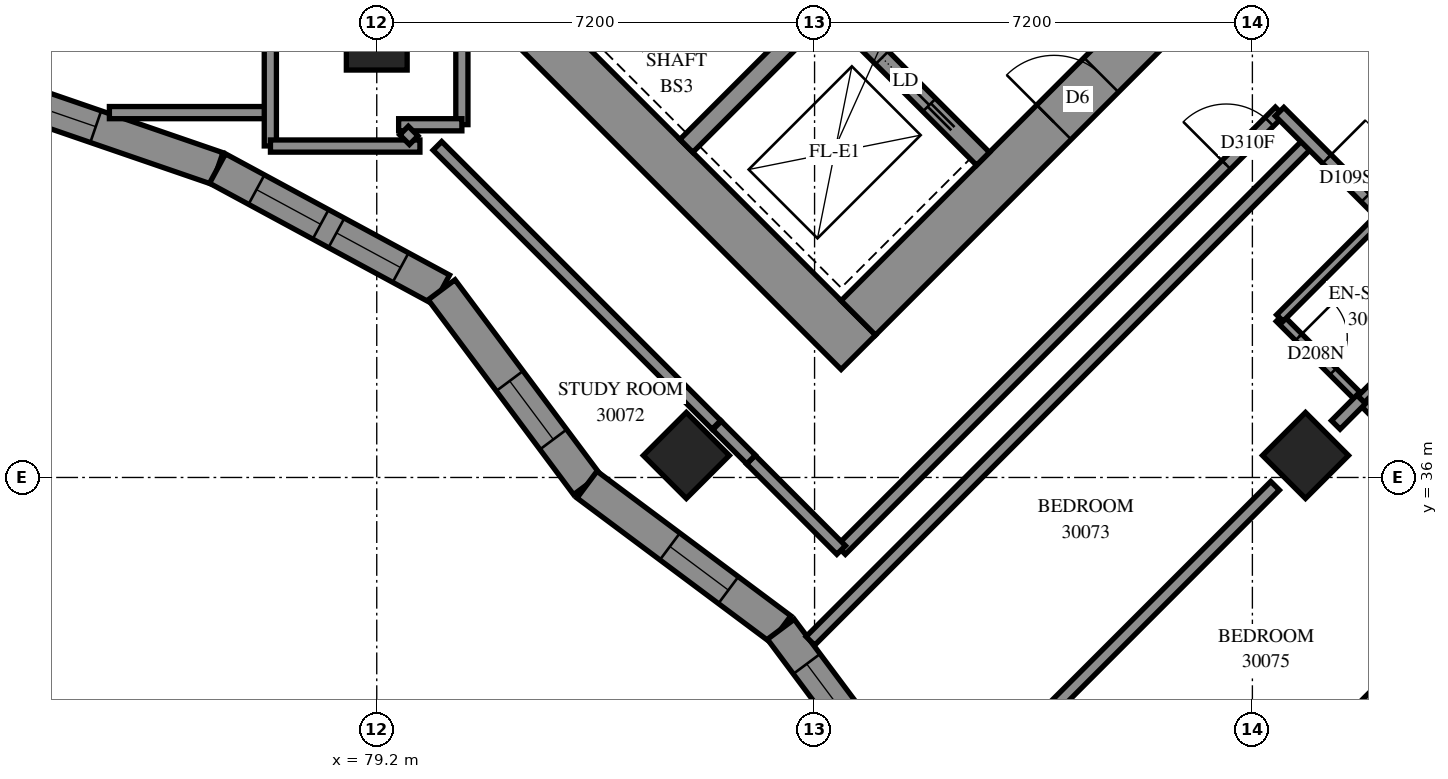
"""IFC4 building model, lengths in metres.
Left out: names, types, materials, properties, quantities, classifications, styles, units other than length and angle.
Written with IfcOpenShell. Run it as: python <this file> out.ifc"""

import sys

from ifc_helpers import new_model, si_unit, direction, frame, frame_2d, origin, origin_2d, place, context, subcontext, project, spatial, polyline, rectangle, outline, extrude, element, fill, save


model = new_model("IFC4")
c1 = context("Model", 3, precision=1e-05, world=origin(), true_north=direction((0.0, 1.0)))
c2 = subcontext(c1, "Body", "Model", "MODEL_VIEW")
j1 = project(units=[si_unit("LENGTHUNIT", "METRE"), si_unit("PLANEANGLEUNIT", "RADIAN")], contexts=[c1])
p1 = place(None, origin())
s1 = spatial("IfcSite", under=j1, at=p1, CompositionType="ELEMENT")
p2 = place(p1, origin())
s2 = spatial("IfcBuilding", under=s1, at=p2, CompositionType="ELEMENT")
p3 = place(p2, frame((0.0, 0.0, 111.8)))
s3 = spatial("IfcBuildingStorey", under=s2, at=p3, CompositionType="ELEMENT", Elevation=111.8)
for number, where, z_axis, x_axis in (
    (1, (79.2, 43.2, 0.0), (0.0, 0.0, 1.0), (1.0, 0.0, 0.0)),
    (2, (84.291, 36.362, 0.0), (0.0, 0.0, 1.0), (0.707, -0.707, 0.0)),
    (3, (94.474, 36.362, 0.0), (0.0, 0.0, 1.0), (0.707, -0.707, 0.0)),
):
    element("IfcColumn", number, at=place(p3, frame(where, z_axis=z_axis, x_axis=x_axis)), inside=s3, PredefinedType="COLUMN", context=c2, shape_type="SweptSolid", body=[
        extrude(rectangle(XDim=1.0, YDim=1.0, at=origin_2d()), origin(), (0.0, 0.0, 1.0), 3.1),
    ])
p4 = place(p3, frame((75.806, 49.373, -0.3), z_axis=(0.0, 0.0, 1.0), x_axis=(0.7071067812, -0.7071067812, 0.0)))
e4 = element("IfcWall", 4, at=p4, inside=s3, PredefinedType="SHEAR", context=c2, shape_type="SweptSolid", body=[
    extrude(rectangle(XDim=16.0, YDim=0.8, at=frame_2d((8.0, 0.0))), origin(), (0.0, 0.0, 1.0), 2.7),
])
p5 = place(p3, frame((87.12, 38.625, -0.3), z_axis=(0.0, 0.0, 1.0), x_axis=(0.7071067812, 0.7071067812, 0.0)))
e5 = element("IfcWall", 5, at=p5, inside=s3, PredefinedType="SHEAR", context=c2, shape_type="SweptSolid", body=[
    extrude(rectangle(XDim=14.4, YDim=0.8, at=frame_2d((7.2, 0.0))), origin(), (0.0, 0.0, 1.0), 2.7),
])
p6 = place(p5, frame((4.55, 0.0, 0.3)))
e6 = element("IfcOpeningElement", 6, at=p6, cuts=e5, PredefinedType="OPENING", context=c2, shape_type="SweptSolid", body=[
    extrude(rectangle(XDim=1.1, YDim=2.1, at=frame_2d((0.55, 1.05))), frame((0.0, 0.41, 0.0), z_axis=(0.0, -1.0, 0.0), x_axis=(1.0, 0.0, 0.0)), (0.0, 0.0, 1.0), 0.82),
])
p7 = place(p5, frame((11.35, 0.0, 0.3)))
e7 = element("IfcOpeningElement", 7, at=p7, cuts=e5, PredefinedType="OPENING", context=c2, shape_type="SweptSolid", body=[
    extrude(rectangle(XDim=1.1, YDim=2.1, at=frame_2d((0.55, 1.05))), frame((0.0, 0.41, 0.0), z_axis=(0.0, -1.0, 0.0), x_axis=(1.0, 0.0, 0.0)), (0.0, 0.0, 1.0), 0.82),
])
p8 = place(p3, frame((84.291, 41.453, 0.0), z_axis=(0.0, 0.0, 1.0), x_axis=(0.7071067812, 0.7071067812, 0.0)))
e8 = element("IfcWall", 8, at=p8, inside=s3, PredefinedType="SOLIDWALL", context=c2, shape_type="SweptSolid", body=[
    extrude(rectangle(XDim=3.3, YDim=0.3, at=frame_2d((1.65, 0.0))), origin(), (0.0, 0.0, 1.0), 3.1),
])
p9 = place(p3, frame((78.988, 51.423, 0.0), z_axis=(0.0, 0.0, 1.0), x_axis=(0.7071067812, -0.7071067812, 0.0)))
e9 = element("IfcWall", 9, at=p9, inside=s3, PredefinedType="SOLIDWALL", context=c2, shape_type="SweptSolid", body=[
    extrude(rectangle(XDim=14.4, YDim=0.3, at=frame_2d((7.2, 0.0))), origin(), (0.0, 0.0, 1.0), 3.1),
])
p10 = place(p9, frame((1.25, 0.0, 0.0)))
e10 = element("IfcOpeningElement", 10, at=p10, cuts=e9, PredefinedType="OPENING", context=c2, shape_type="SweptSolid", body=[
    extrude(rectangle(XDim=1.1, YDim=2.1, at=frame_2d((0.55, 1.05))), frame((0.0, 0.16, 0.0), z_axis=(0.0, -1.0, 0.0), x_axis=(1.0, 0.0, 0.0)), (0.0, 0.0, 1.0), 0.32),
])
p11 = place(p9, frame((4.85, 0.0, 0.0)))
e11 = element("IfcOpeningElement", 11, at=p11, cuts=e9, PredefinedType="OPENING", context=c2, shape_type="SweptSolid", body=[
    extrude(rectangle(XDim=1.1, YDim=2.1, at=frame_2d((0.55, 1.05))), frame((0.0, 0.16, 0.0), z_axis=(0.0, -1.0, 0.0), x_axis=(1.0, 0.0, 0.0)), (0.0, 0.0, 1.0), 0.32),
])
p12 = place(p9, frame((8.45, 0.0, 0.0)))
e12 = element("IfcOpeningElement", 12, at=p12, cuts=e9, PredefinedType="OPENING", context=c2, shape_type="SweptSolid", body=[
    extrude(rectangle(XDim=1.1, YDim=2.1, at=frame_2d((0.55, 1.05))), frame((0.0, 0.16, 0.0), z_axis=(0.0, -1.0, 0.0), x_axis=(1.0, 0.0, 0.0)), (0.0, 0.0, 1.0), 0.32),
])
p13 = place(p9, frame((12.05, 0.0, 0.0)))
e13 = element("IfcOpeningElement", 13, at=p13, cuts=e9, PredefinedType="OPENING", context=c2, shape_type="SweptSolid", body=[
    extrude(rectangle(XDim=1.1, YDim=2.1, at=frame_2d((0.55, 1.05))), frame((0.0, 0.16, 0.0), z_axis=(0.0, -1.0, 0.0), x_axis=(1.0, 0.0, 0.0)), (0.0, 0.0, 1.0), 0.32),
])
p14 = place(p3, frame((73.085, 42.283, 0.0), z_axis=(0.0, 0.0, 1.0), x_axis=(0.9456660696, -0.3251394852, 0.0)))
e14 = element("IfcWall", 14, at=p14, inside=s3, PredefinedType="SOLIDWALL", context=c2, shape_type="SweptSolid", body=[
    extrude(outline(polyline([(0.07, -0.275), (3.675, -0.275), (3.72, 0.275), (-0.07, 0.275), (0.07, -0.275)])), origin(), (0.0, 0.0, 1.0), 3.1),
])
p15 = place(p14, frame((0.38, 0.0, 0.5)))
e15 = element("IfcOpeningElement", 15, at=p15, cuts=e14, PredefinedType="OPENING", context=c2, shape_type="SweptSolid", body=[
    extrude(rectangle(XDim=1.2, YDim=2.45, at=frame_2d((0.6, 1.225))), frame((0.0, 0.285, 0.0), z_axis=(0.0, -1.0, 0.0), x_axis=(1.0, 0.0, 0.0)), (0.0, 0.0, 1.0), 0.57),
])
p16 = place(p3, frame((76.581, 41.081, 0.0), z_axis=(0.0, 0.0, 1.0), x_axis=(0.8794967773, -0.475904842, 0.0)))
e16 = element("IfcWall", 16, at=p16, inside=s3, PredefinedType="SOLIDWALL", context=c2, shape_type="SweptSolid", body=[
    extrude(outline(polyline([(0.023, -0.275), (4.13, -0.275), (4.251, 0.275), (-0.023, 0.275), (0.023, -0.275)])), origin(), (0.0, 0.0, 1.0), 3.1),
])
p17 = place(p16, frame((0.729, 0.0, 0.5)))
e17 = element("IfcOpeningElement", 17, at=p17, cuts=e16, PredefinedType="OPENING", context=c2, shape_type="SweptSolid", body=[
    extrude(rectangle(XDim=1.2, YDim=2.45, at=frame_2d((0.6, 1.225))), frame((0.0, 0.285, 0.0), z_axis=(0.0, -1.0, 0.0), x_axis=(1.0, 0.0, 0.0)), (0.0, 0.0, 1.0), 0.57),
])
p18 = place(p16, frame((2.224, 0.0, 0.5)))
e18 = element("IfcOpeningElement", 18, at=p18, cuts=e16, PredefinedType="OPENING", context=c2, shape_type="SweptSolid", body=[
    extrude(rectangle(XDim=1.2, YDim=2.45, at=frame_2d((0.6, 1.225))), frame((0.0, 0.285, 0.0), z_axis=(0.0, -1.0, 0.0), x_axis=(1.0, 0.0, 0.0)), (0.0, 0.0, 1.0), 0.57),
])
p19 = place(p3, frame((80.266, 39.087, 0.0), z_axis=(0.0, 0.0, 1.0), x_axis=(0.5980693066, -0.8014443864, 0.0)))
e19 = element("IfcWall", 19, at=p19, inside=s3, PredefinedType="SOLIDWALL", context=c2, shape_type="SweptSolid", body=[
    extrude(outline(polyline([(0.061, -0.275), (4.038, -0.275), (3.958, 0.275), (-0.061, 0.275), (0.061, -0.275)])), origin(), (0.0, 0.0, 1.0), 3.1),
])
p20 = place(p19, frame((1.871, 0.0, 0.5)))
e20 = element("IfcOpeningElement", 20, at=p20, cuts=e19, PredefinedType="OPENING", context=c2, shape_type="SweptSolid", body=[
    extrude(rectangle(XDim=1.2, YDim=2.45, at=frame_2d((0.6, 1.225))), frame((0.0, 0.285, 0.0), z_axis=(0.0, -1.0, 0.0), x_axis=(1.0, 0.0, 0.0)), (0.0, 0.0, 1.0), 0.57),
])
p21 = place(p3, frame((82.658, 35.882, 0.0), z_axis=(0.0, 0.0, 1.0), x_axis=(0.8014458841, -0.5980672997, 0.0)))
e21 = element("IfcWall", 21, at=p21, inside=s3, PredefinedType="SOLIDWALL", context=c2, shape_type="SweptSolid", body=[
    extrude(outline(polyline([(-0.04, -0.275), (3.937, -0.275), (4.017, 0.275), (0.04, 0.275), (-0.04, -0.275)])), origin(), (0.0, 0.0, 1.0), 3.1),
])
p22 = place(p21, frame((1.701, 0.0, 0.5)))
e22 = element("IfcOpeningElement", 22, at=p22, cuts=e21, PredefinedType="OPENING", context=c2, shape_type="SweptSolid", body=[
    extrude(rectangle(XDim=1.2, YDim=2.45, at=frame_2d((0.6, 1.225))), frame((0.0, 0.285, 0.0), z_axis=(0.0, -1.0, 0.0), x_axis=(1.0, 0.0, 0.0)), (0.0, 0.0, 1.0), 0.57),
])
p23 = place(p3, frame((85.845, 33.504, 0.0), z_axis=(0.0, 0.0, 1.0), x_axis=(0.5980713977, -0.801442826, 0.0)))
e23 = element("IfcWall", 23, at=p23, inside=s3, PredefinedType="SOLIDWALL", context=c2, shape_type="SweptSolid", body=[
    extrude(outline(polyline([(0.04, -0.275), (4.017, -0.275), (3.937, 0.275), (-0.04, 0.275), (0.04, -0.275)])), origin(), (0.0, 0.0, 1.0), 3.1),
])
p24 = place(p23, frame((0.711, 0.0, 0.5)))
e24 = element("IfcOpeningElement", 24, at=p24, cuts=e23, PredefinedType="OPENING", context=c2, shape_type="SweptSolid", body=[
    extrude(rectangle(XDim=1.3, YDim=2.45, at=frame_2d((0.65, 1.225))), frame((0.0, 0.285, 0.0), z_axis=(0.0, -1.0, 0.0), x_axis=(1.0, 0.0, 0.0)), (0.0, 0.0, 1.0), 0.57),
])
p25 = place(p23, frame((2.211, 0.0, 0.5)))
e25 = element("IfcOpeningElement", 25, at=p25, cuts=e23, PredefinedType="OPENING", context=c2, shape_type="SweptSolid", body=[
    extrude(rectangle(XDim=1.3, YDim=2.45, at=frame_2d((0.65, 1.225))), frame((0.0, 0.285, 0.0), z_axis=(0.0, -1.0, 0.0), x_axis=(1.0, 0.0, 0.0)), (0.0, 0.0, 1.0), 0.57),
])
p26 = place(p3, frame((86.331, 33.312, 0.0), z_axis=(0.0, 0.0, 1.0), x_axis=(0.707102476, 0.7071110864, 0.0)))
e26 = element("IfcWall", 26, at=p26, inside=s3, PredefinedType="PARTITIONING", context=c2, shape_type="SweptSolid", body=[
    extrude(rectangle(XDim=11.614, YDim=0.2, at=frame_2d((5.807, 0.0))), origin(), (0.0, 0.0, 1.0), 3.1),
])
p27 = place(p3, frame((91.452, 28.25, 0.0), z_axis=(0.0, 0.0, 1.0), x_axis=(0.7071931897, 0.7070203621, 0.0)))
e27 = element("IfcWall", 27, at=p27, inside=s3, PredefinedType="PARTITIONING", context=c2, shape_type="SweptSolid", body=[
    extrude(rectangle(XDim=11.572, YDim=0.2, at=frame_2d((5.786, 0.0))), origin(), (0.0, 0.0, 1.0), 3.1),
])
p28 = place(p3, frame((86.835, 34.806, 0.0), z_axis=(0.0, 0.0, 1.0), x_axis=(0.7071067812, 0.7071067812, 0.0)))
e28 = element("IfcWall", 28, at=p28, inside=s3, PredefinedType="PARTITIONING", context=c2, shape_type="SweptSolid", body=[
    extrude(rectangle(XDim=10.201, YDim=0.2, at=frame_2d((5.1, 0.0))), origin(), (0.0, 0.0, 1.0), 3.1),
])
p29 = place(p28, frame((8.959, 0.0, 0.0)))
e29 = element("IfcOpeningElement", 29, at=p29, cuts=e28, PredefinedType="OPENING", context=c2, shape_type="SweptSolid", body=[
    extrude(rectangle(XDim=1.0, YDim=2.1, at=frame_2d((0.5, 1.05))), frame((0.0, 0.11, 0.0), z_axis=(0.0, -1.0, 0.0), x_axis=(1.0, 0.0, 0.0)), (0.0, 0.0, 1.0), 0.22),
])
p30 = place(p3, frame((94.047, 42.015, 0.0), z_axis=(0.0, 0.0, 1.0), x_axis=(0.7071067812, -0.7071067812, 0.0)))
e30 = element("IfcWall", 30, at=p30, inside=s3, PredefinedType="PARTITIONING", context=c2, shape_type="SweptSolid", body=[
    extrude(rectangle(XDim=9.6, YDim=0.2, at=frame_2d((4.8, 0.0))), origin(), (0.0, 0.0, 1.0), 3.1),
])
p31 = place(p30, frame((1.099, 0.0, 0.0)))
e31 = element("IfcOpeningElement", 31, at=p31, cuts=e30, PredefinedType="OPENING", context=c2, shape_type="SweptSolid", body=[
    extrude(rectangle(XDim=0.9, YDim=2.1, at=frame_2d((0.45, 1.05))), frame((0.0, 0.11, 0.0), z_axis=(0.0, -1.0, 0.0), x_axis=(1.0, 0.0, 0.0)), (0.0, 0.0, 1.0), 0.22),
])
p32 = place(p30, frame((6.649, 0.0, 0.0)))
e32 = element("IfcOpeningElement", 32, at=p32, cuts=e30, PredefinedType="OPENING", context=c2, shape_type="SweptSolid", body=[
    extrude(rectangle(XDim=0.9, YDim=2.1, at=frame_2d((0.45, 1.05))), frame((0.0, 0.11, 0.0), z_axis=(0.0, -1.0, 0.0), x_axis=(1.0, 0.0, 0.0)), (0.0, 0.0, 1.0), 0.22),
])
p33 = place(p30, frame((8.3, 0.0, 0.0)))
e33 = element("IfcOpeningElement", 33, at=p33, cuts=e30, PredefinedType="OPENING", context=c2, shape_type="SweptSolid", body=[
    extrude(rectangle(XDim=0.9, YDim=2.1, at=frame_2d((0.45, 1.05))), frame((0.0, 0.11, 0.0), z_axis=(0.0, -1.0, 0.0), x_axis=(1.0, 0.0, 0.0)), (0.0, 0.0, 1.0), 0.22),
])
p34 = place(p3, frame((80.197, 41.453, 0.0), z_axis=(0.0, 0.0, 1.0), x_axis=(0.7071067812, -0.7071067812, 0.0)))
e34 = element("IfcWall", 34, at=p34, inside=s3, PredefinedType="PARTITIONING", context=c2, shape_type="SweptSolid", body=[
    extrude(rectangle(XDim=6.488, YDim=0.2, at=frame_2d((3.244, 0.0))), origin(), (0.0, 0.0, 1.0), 3.1),
])
p35 = place(p3, frame((89.881, 31.771, 0.0), z_axis=(0.0, 0.0, 1.0), x_axis=(0.7071067812, 0.7071067812, 0.0)))
e35 = element("IfcWall", 35, at=p35, inside=s3, PredefinedType="PARTITIONING", context=c2, shape_type="SweptSolid", body=[
    extrude(rectangle(XDim=5.787, YDim=0.2, at=frame_2d((2.893, 0.0))), origin(), (0.0, 0.0, 1.0), 3.1),
])
p36 = place(p3, frame((94.047, 38.621, 0.0), z_axis=(0.0, 0.0, 1.0), x_axis=(0.7071067812, -0.7071067812, 0.0)))
e36 = element("IfcWall", 36, at=p36, inside=s3, PredefinedType="PARTITIONING", context=c2, shape_type="SweptSolid", body=[
    extrude(rectangle(XDim=3.799, YDim=0.15, at=frame_2d((1.899, 0.0))), origin(), (0.0, 0.0, 1.0), 3.1),
])
p37 = place(p36, frame((0.444, 0.0, 0.0)))
e37 = element("IfcOpeningElement", 37, at=p37, cuts=e36, PredefinedType="OPENING", context=c2, shape_type="SweptSolid", body=[
    extrude(rectangle(XDim=0.8, YDim=2.1, at=frame_2d((0.4, 1.05))), frame((0.0, 0.085, 0.0), z_axis=(0.0, -1.0, 0.0), x_axis=(1.0, 0.0, 0.0)), (0.0, 0.0, 1.0), 0.17),
])
p38 = place(p36, frame((2.551, 0.0, 0.0)))
e38 = element("IfcOpeningElement", 38, at=p38, cuts=e36, PredefinedType="OPENING", context=c2, shape_type="SweptSolid", body=[
    extrude(rectangle(XDim=0.8, YDim=2.1, at=frame_2d((0.4, 1.05))), frame((0.0, 0.085, 0.0), z_axis=(0.0, -1.0, 0.0), x_axis=(1.0, 0.0, 0.0)), (0.0, 0.0, 1.0), 0.17),
])
p39 = place(p3, frame((74.803, 42.0, 0.0), z_axis=(0.0, 0.0, 1.0), x_axis=(1.0, 0.0, 0.0)))
e39 = element("IfcWall", 39, at=p39, inside=s3, PredefinedType="PARTITIONING", context=c2, shape_type="SweptSolid", body=[
    extrude(rectangle(XDim=2.647, YDim=0.2, at=frame_2d((1.323, 0.0))), origin(), (0.0, 0.0, 1.0), 3.1),
])
for number, where, z_axis, x_axis in (
    (40, (77.45, 41.452, 0.0), (0.0, 0.0, 1.0), (0.0, 1.0, 0.0)),
    (41, (77.452, 41.45, 0.0), (0.0, 0.0, 1.0), (1.0, 0.0, 0.0)),
):
    element("IfcWall", number, at=place(p3, frame(where, z_axis=z_axis, x_axis=x_axis)), inside=s3, PredefinedType="PARTITIONING", context=c2, shape_type="SweptSolid", body=[
        extrude(rectangle(XDim=2.458, YDim=0.2, at=frame_2d((1.229, 0.0))), origin(), (0.0, 0.0, 1.0), 3.1),
    ])
for number, where, z_axis, x_axis in (
    (42, (95.389, 37.285, 0.0), (0.0, 0.0, 1.0), (0.708, 0.707, 0.0)),
    (43, (94.052, 38.622, 0.0), (0.0, 0.0, 1.0), (0.707, 0.708, 0.0)),
):
    element("IfcWall", number, at=place(p3, frame(where, z_axis=z_axis, x_axis=x_axis)), inside=s3, PredefinedType="PARTITIONING", context=c2, shape_type="SweptSolid", body=[
        extrude(rectangle(XDim=2.4, YDim=0.15, at=frame_2d((1.2, 0.0))), origin(), (0.0, 0.0, 1.0), 3.1),
    ])
p40 = place(p3, frame((85.353, 36.293, 0.0), z_axis=(0.0, 0.0, 1.0), x_axis=(0.7066304548, -0.7075827869, 0.0)))
e44 = element("IfcWall", 44, at=p40, inside=s3, PredefinedType="PARTITIONING", context=c2, shape_type="SweptSolid", body=[
    extrude(rectangle(XDim=2.1, YDim=0.2, at=frame_2d((1.05, 0.0))), origin(), (0.0, 0.0, 1.0), 3.1),
])
p41 = place(p3, frame((80.6, 41.802, 0.0), z_axis=(0.0, 0.0, 1.0), x_axis=(0.0, 1.0, 0.0)))
e45 = element("IfcWall", 45, at=p41, inside=s3, PredefinedType="PARTITIONING", context=c2, shape_type="SweptSolid", body=[
    extrude(rectangle(XDim=2.098, YDim=0.2, at=frame_2d((1.049, 0.0))), origin(), (0.0, 0.0, 1.0), 3.1),
])
p42 = place(p3, frame((79.56, 41.8, 0.0), z_axis=(0.0, 0.0, 1.0), x_axis=(1.0, 0.0, 0.0)))
e46 = element("IfcWall", 46, at=p42, inside=s3, PredefinedType="PARTITIONING", context=c2, shape_type="SweptSolid", body=[
    extrude(rectangle(XDim=1.04, YDim=0.2, at=frame_2d((0.52, 0.0))), origin(), (0.0, 0.0, 1.0), 3.1),
])
p43 = place(p3, frame((84.795, 36.855, 0.0), z_axis=(0.0, 0.0, 1.0), x_axis=(0.7071067812, -0.7071067812, 0.0)))
e47 = element("IfcWall", 47, at=p43, inside=s3, PredefinedType="PARTITIONING", context=c2, shape_type="SweptSolid", body=[
    extrude(rectangle(XDim=0.792, YDim=0.2, at=frame_2d((0.396, 0.0))), origin(), (0.0, 0.0, 1.0), 3.1),
])
p44 = place(p3, frame((94.971, 36.865, 0.0), z_axis=(0.0, 0.0, 1.0), x_axis=(0.7054171665, 0.7087923682, 0.0)))
e48 = element("IfcWall", 48, at=p44, inside=s3, PredefinedType="PARTITIONING", context=c2, shape_type="SweptSolid", body=[
    extrude(rectangle(XDim=0.593, YDim=0.2, at=frame_2d((0.296, 0.0))), origin(), (0.0, 0.0, 1.0), 3.1),
])
p45 = place(p3, frame((79.649, 41.705, 0.0), z_axis=(0.0, 0.0, 1.0), x_axis=(0.7068844555, -0.707329037, 0.0)))
e49 = element("IfcWall", 49, at=p45, inside=s3, PredefinedType="PARTITIONING", context=c2, shape_type="SweptSolid", body=[
    extrude(rectangle(XDim=0.225, YDim=0.2, at=frame_2d((0.112, 0.0))), origin(), (0.0, 0.0, 1.0), 3.1),
])
p46 = place(p15, origin())
e50 = element("IfcWindow", 50, at=p46, inside=s3, PartitioningType="SINGLE_PANEL", PredefinedType="WINDOW", context=c2, shape_type="SweptSolid", body=[
    extrude(rectangle(XDim=1.2, YDim=2.45, at=frame_2d((0.6, 1.225))), frame((0.0, 0.155, 0.0), z_axis=(0.0, -1.0, 0.0), x_axis=(1.0, 0.0, 0.0)), (0.0, 0.0, 1.0), 0.06),
])
fill(e15, e50)
p47 = place(p17, origin())
e51 = element("IfcWindow", 51, at=p47, inside=s3, PartitioningType="SINGLE_PANEL", PredefinedType="WINDOW", context=c2, shape_type="SweptSolid", body=[
    extrude(rectangle(XDim=1.2, YDim=2.45, at=frame_2d((0.6, 1.225))), frame((0.0, 0.155, 0.0), z_axis=(0.0, -1.0, 0.0), x_axis=(1.0, 0.0, 0.0)), (0.0, 0.0, 1.0), 0.06),
])
fill(e17, e51)
p48 = place(p18, origin())
e52 = element("IfcWindow", 52, at=p48, inside=s3, PartitioningType="SINGLE_PANEL", PredefinedType="WINDOW", context=c2, shape_type="SweptSolid", body=[
    extrude(rectangle(XDim=1.2, YDim=2.45, at=frame_2d((0.6, 1.225))), frame((0.0, 0.155, 0.0), z_axis=(0.0, -1.0, 0.0), x_axis=(1.0, 0.0, 0.0)), (0.0, 0.0, 1.0), 0.06),
])
fill(e18, e52)
p49 = place(p20, origin())
e53 = element("IfcWindow", 53, at=p49, inside=s3, PartitioningType="SINGLE_PANEL", PredefinedType="WINDOW", context=c2, shape_type="SweptSolid", body=[
    extrude(rectangle(XDim=1.2, YDim=2.45, at=frame_2d((0.6, 1.225))), frame((0.0, 0.155, 0.0), z_axis=(0.0, -1.0, 0.0), x_axis=(1.0, 0.0, 0.0)), (0.0, 0.0, 1.0), 0.06),
])
fill(e20, e53)
p50 = place(p22, origin())
e54 = element("IfcWindow", 54, at=p50, inside=s3, PartitioningType="SINGLE_PANEL", PredefinedType="WINDOW", context=c2, shape_type="SweptSolid", body=[
    extrude(rectangle(XDim=1.2, YDim=2.45, at=frame_2d((0.6, 1.225))), frame((0.0, 0.155, 0.0), z_axis=(0.0, -1.0, 0.0), x_axis=(1.0, 0.0, 0.0)), (0.0, 0.0, 1.0), 0.06),
])
fill(e22, e54)
p51 = place(p24, origin())
e55 = element("IfcWindow", 55, at=p51, inside=s3, PartitioningType="SINGLE_PANEL", PredefinedType="WINDOW", context=c2, shape_type="SweptSolid", body=[
    extrude(rectangle(XDim=1.3, YDim=2.45, at=frame_2d((0.65, 1.225))), frame((0.0, 0.155, 0.0), z_axis=(0.0, -1.0, 0.0), x_axis=(1.0, 0.0, 0.0)), (0.0, 0.0, 1.0), 0.06),
])
fill(e24, e55)
p52 = place(p6, origin())
e56 = element("IfcDoor", 56, at=p52, inside=s3, OperationType="DOUBLE_DOOR_SINGLE_SWING", PredefinedType="DOOR", context=c2, shape_type="SweptSolid", body=[
    extrude(rectangle(XDim=1.1, YDim=2.1, at=frame_2d((0.55, 1.05))), frame((0.0, 0.025, 0.0), z_axis=(0.0, -1.0, 0.0), x_axis=(1.0, 0.0, 0.0)), (0.0, 0.0, 1.0), 0.05),
])
fill(e6, e56)
p53 = place(p13, origin())
e57 = element("IfcDoor", 57, at=p53, inside=s3, OperationType="SLIDING_TO_RIGHT", PredefinedType="DOOR", context=c2, shape_type="SweptSolid", body=[
    extrude(rectangle(XDim=1.1, YDim=2.1, at=frame_2d((0.55, 1.05))), frame((0.0, 0.025, 0.0), z_axis=(0.0, -1.0, 0.0), x_axis=(1.0, 0.0, 0.0)), (0.0, 0.0, 1.0), 0.05),
])
fill(e13, e57)
p54 = place(p29, origin())
e58 = element("IfcDoor", 58, at=p54, inside=s3, OperationType="SINGLE_SWING_LEFT", PredefinedType="DOOR", context=c2, shape_type="SweptSolid", body=[
    extrude(rectangle(XDim=1.0, YDim=2.1, at=frame_2d((0.5, 1.05))), frame((0.0, 0.025, 0.0), z_axis=(0.0, -1.0, 0.0), x_axis=(1.0, 0.0, 0.0)), (0.0, 0.0, 1.0), 0.05),
])
fill(e29, e58)
p55 = place(p31, origin())
e59 = element("IfcDoor", 59, at=p55, inside=s3, OperationType="SINGLE_SWING_LEFT", PredefinedType="DOOR", context=c2, shape_type="SweptSolid", body=[
    extrude(rectangle(XDim=0.9, YDim=2.1, at=frame_2d((0.45, 1.05))), frame((0.0, 0.025, 0.0), z_axis=(0.0, -1.0, 0.0), x_axis=(1.0, 0.0, 0.0)), (0.0, 0.0, 1.0), 0.05),
])
fill(e31, e59)
p56 = place(p37, origin())
e60 = element("IfcDoor", 60, at=p56, inside=s3, OperationType="SINGLE_SWING_RIGHT", PredefinedType="DOOR", context=c2, shape_type="SweptSolid", body=[
    extrude(rectangle(XDim=0.8, YDim=2.1, at=frame_2d((0.4, 1.05))), frame((0.0, 0.025, 0.0), z_axis=(0.0, -1.0, 0.0), x_axis=(1.0, 0.0, 0.0)), (0.0, 0.0, 1.0), 0.05),
])
fill(e37, e60)
save(model, sys.argv[1])
